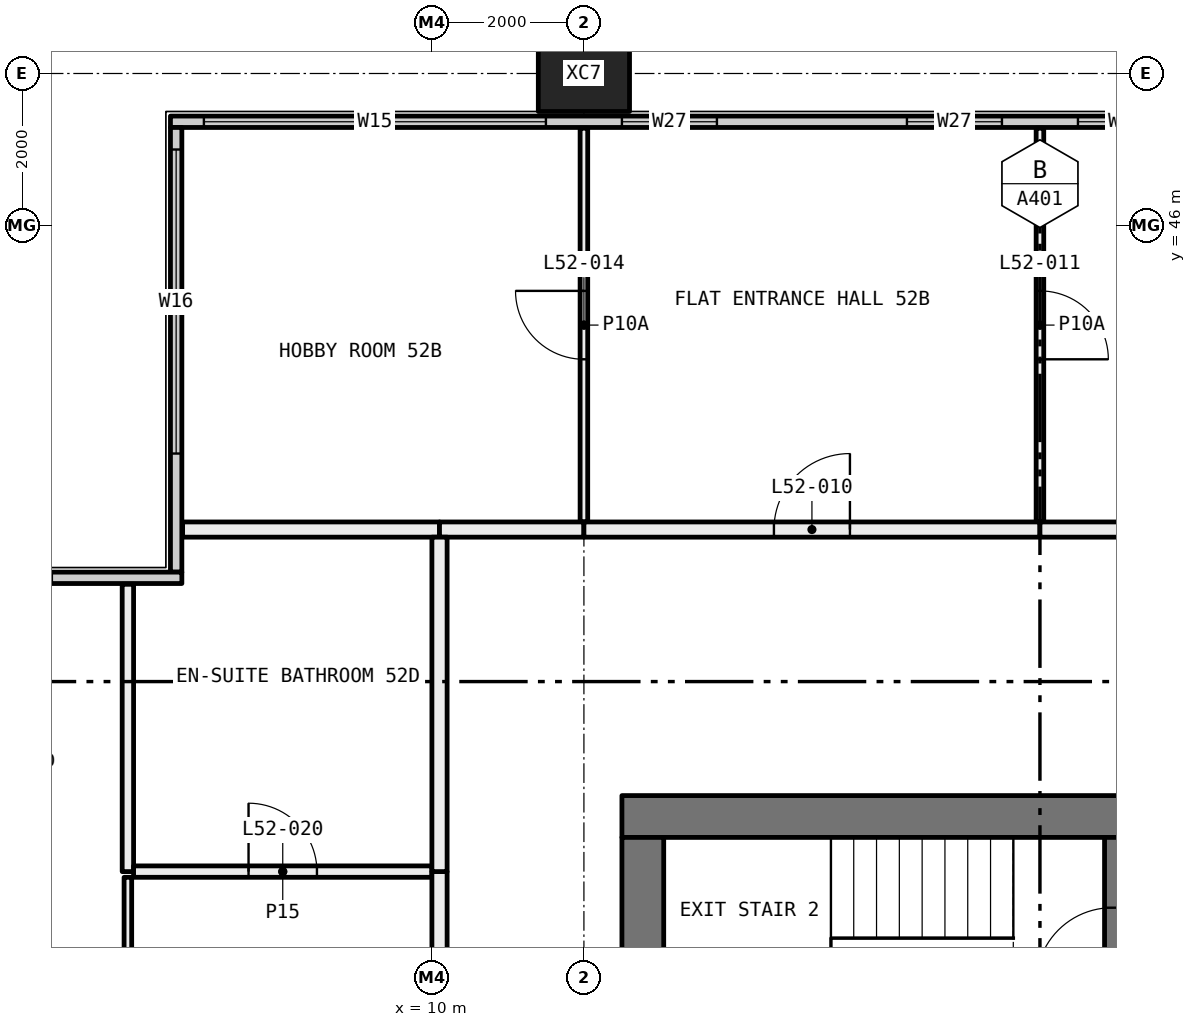
"""IFC4 building model, lengths in metres.
Left out: names, types, materials, properties, quantities, classifications, styles, units other than length and angle.
Written with IfcOpenShell. Run it as: python <this file> out.ifc"""

import sys

from ifc_helpers import new_model, si_unit, direction, frame, frame_2d, origin, origin_2d, place, context, subcontext, project, spatial, rectangle, hollow_rectangle, extrude, element, fill, save


model = new_model("IFC4")
c1 = context("Model", 3, precision=1e-05, world=origin(), true_north=direction((0.0, 1.0)))
c2 = subcontext(c1, "Body", "Model", "MODEL_VIEW")
j1 = project(units=[si_unit("LENGTHUNIT", "METRE"), si_unit("PLANEANGLEUNIT", "RADIAN")], contexts=[c1])
p1 = place(None, origin())
s1 = spatial("IfcSite", under=j1, at=p1, CompositionType="ELEMENT")
p2 = place(p1, origin())
s2 = spatial("IfcBuilding", under=s1, at=p2, CompositionType="ELEMENT")
p3 = place(p2, frame((0.0, 0.0, 196.2)))
s3 = spatial("IfcBuildingStorey", under=s2, at=p3, CompositionType="ELEMENT", Elevation=196.2)
p4 = place(p3, frame((12.0, 48.0, -0.4), z_axis=(0.0, 0.0, 1.0), x_axis=(1.0, 0.0, 0.0)))
e1 = element("IfcColumn", 1, at=p4, inside=s3, PredefinedType="COLUMN", context=c2, shape_type="SweptSolid", body=[
    extrude(hollow_rectangle(XDim=1.2, YDim=1.0, WallThickness=0.045, at=origin_2d()), origin(), (0.0, 0.0, 1.0), 3.45),
])
p5 = place(p3, frame((6.56, 47.365, 0.0), z_axis=(0.0, 0.0, 1.0), x_axis=(1.0, 0.0, 0.0)))
e2 = element("IfcWall", 2, at=p5, inside=s3, PredefinedType="ELEMENTEDWALL", context=c2, shape_type="SweptSolid", body=[
    extrude(rectangle(XDim=46.88, YDim=0.15, at=frame_2d((23.44, 0.0))), origin(), (0.0, 0.0, 1.0), 3.05),
])
p6 = place(p5, frame((0.44, 0.0, 0.45)))
e3 = element("IfcOpeningElement", 3, at=p6, cuts=e2, PredefinedType="OPENING", context=c2, shape_type="SweptSolid", body=[
    extrude(rectangle(XDim=4.5, YDim=2.55, at=frame_2d((2.25, 1.275))), frame((0.0, 0.085, 0.0), z_axis=(0.0, -1.0, 0.0), x_axis=(1.0, 0.0, 0.0)), (0.0, 0.0, 1.0), 0.17),
])
p7 = place(p5, frame((5.94, 0.0, 0.45)))
e4 = element("IfcOpeningElement", 4, at=p7, cuts=e2, PredefinedType="OPENING", context=c2, shape_type="SweptSolid", body=[
    extrude(rectangle(XDim=1.25, YDim=2.55, at=frame_2d((0.625, 1.275))), frame((0.0, 0.085, 0.0), z_axis=(0.0, -1.0, 0.0), x_axis=(1.0, 0.0, 0.0)), (0.0, 0.0, 1.0), 0.17),
])
p8 = place(p5, frame((9.69, 0.0, 0.45)))
e5 = element("IfcOpeningElement", 5, at=p8, cuts=e2, PredefinedType="OPENING", context=c2, shape_type="SweptSolid", body=[
    extrude(rectangle(XDim=1.25, YDim=2.55, at=frame_2d((0.625, 1.275))), frame((0.0, 0.085, 0.0), z_axis=(0.0, -1.0, 0.0), x_axis=(1.0, 0.0, 0.0)), (0.0, 0.0, 1.0), 0.17),
])
p9 = place(p5, frame((11.94, 0.0, 0.45)))
e6 = element("IfcOpeningElement", 6, at=p9, cuts=e2, PredefinedType="OPENING", context=c2, shape_type="SweptSolid", body=[
    extrude(rectangle(XDim=1.25, YDim=2.55, at=frame_2d((0.625, 1.275))), frame((0.0, 0.085, 0.0), z_axis=(0.0, -1.0, 0.0), x_axis=(1.0, 0.0, 0.0)), (0.0, 0.0, 1.0), 0.17),
])
p10 = place(p5, frame((15.69, 0.0, 0.45)))
e7 = element("IfcOpeningElement", 7, at=p10, cuts=e2, PredefinedType="OPENING", context=c2, shape_type="SweptSolid", body=[
    extrude(rectangle(XDim=1.25, YDim=2.55, at=frame_2d((0.625, 1.275))), frame((0.0, 0.085, 0.0), z_axis=(0.0, -1.0, 0.0), x_axis=(1.0, 0.0, 0.0)), (0.0, 0.0, 1.0), 0.17),
])
p11 = place(p5, frame((17.94, 0.0, 0.45)))
e8 = element("IfcOpeningElement", 8, at=p11, cuts=e2, PredefinedType="OPENING", context=c2, shape_type="SweptSolid", body=[
    extrude(rectangle(XDim=1.25, YDim=2.55, at=frame_2d((0.625, 1.275))), frame((0.0, 0.085, 0.0), z_axis=(0.0, -1.0, 0.0), x_axis=(1.0, 0.0, 0.0)), (0.0, 0.0, 1.0), 0.17),
])
p12 = place(p5, frame((21.69, 0.0, 0.45)))
e9 = element("IfcOpeningElement", 9, at=p12, cuts=e2, PredefinedType="OPENING", context=c2, shape_type="SweptSolid", body=[
    extrude(rectangle(XDim=1.25, YDim=2.55, at=frame_2d((0.625, 1.275))), frame((0.0, 0.085, 0.0), z_axis=(0.0, -1.0, 0.0), x_axis=(1.0, 0.0, 0.0)), (0.0, 0.0, 1.0), 0.17),
])
p13 = place(p5, frame((23.94, 0.0, 0.45)))
e10 = element("IfcOpeningElement", 10, at=p13, cuts=e2, PredefinedType="OPENING", context=c2, shape_type="SweptSolid", body=[
    extrude(rectangle(XDim=1.25, YDim=2.55, at=frame_2d((0.625, 1.275))), frame((0.0, 0.085, 0.0), z_axis=(0.0, -1.0, 0.0), x_axis=(1.0, 0.0, 0.0)), (0.0, 0.0, 1.0), 0.17),
])
p14 = place(p5, frame((27.69, 0.0, 0.45)))
e11 = element("IfcOpeningElement", 11, at=p14, cuts=e2, PredefinedType="OPENING", context=c2, shape_type="SweptSolid", body=[
    extrude(rectangle(XDim=1.25, YDim=2.55, at=frame_2d((0.625, 1.275))), frame((0.0, 0.085, 0.0), z_axis=(0.0, -1.0, 0.0), x_axis=(1.0, 0.0, 0.0)), (0.0, 0.0, 1.0), 0.17),
])
p15 = place(p5, frame((29.94, 0.0, 0.45)))
e12 = element("IfcOpeningElement", 12, at=p15, cuts=e2, PredefinedType="OPENING", context=c2, shape_type="SweptSolid", body=[
    extrude(rectangle(XDim=1.25, YDim=2.55, at=frame_2d((0.625, 1.275))), frame((0.0, 0.085, 0.0), z_axis=(0.0, -1.0, 0.0), x_axis=(1.0, 0.0, 0.0)), (0.0, 0.0, 1.0), 0.17),
])
p16 = place(p5, frame((33.69, 0.0, 0.45)))
e13 = element("IfcOpeningElement", 13, at=p16, cuts=e2, PredefinedType="OPENING", context=c2, shape_type="SweptSolid", body=[
    extrude(rectangle(XDim=1.25, YDim=2.55, at=frame_2d((0.625, 1.275))), frame((0.0, 0.085, 0.0), z_axis=(0.0, -1.0, 0.0), x_axis=(1.0, 0.0, 0.0)), (0.0, 0.0, 1.0), 0.17),
])
p17 = place(p5, frame((35.94, 0.0, 0.45)))
e14 = element("IfcOpeningElement", 14, at=p17, cuts=e2, PredefinedType="OPENING", context=c2, shape_type="SweptSolid", body=[
    extrude(rectangle(XDim=1.25, YDim=2.55, at=frame_2d((0.625, 1.275))), frame((0.0, 0.085, 0.0), z_axis=(0.0, -1.0, 0.0), x_axis=(1.0, 0.0, 0.0)), (0.0, 0.0, 1.0), 0.17),
])
p18 = place(p5, frame((39.69, 0.0, 0.45)))
e15 = element("IfcOpeningElement", 15, at=p18, cuts=e2, PredefinedType="OPENING", context=c2, shape_type="SweptSolid", body=[
    extrude(rectangle(XDim=1.25, YDim=2.55, at=frame_2d((0.625, 1.275))), frame((0.0, 0.085, 0.0), z_axis=(0.0, -1.0, 0.0), x_axis=(1.0, 0.0, 0.0)), (0.0, 0.0, 1.0), 0.17),
])
p19 = place(p5, frame((41.94, 0.0, 0.45)))
e16 = element("IfcOpeningElement", 16, at=p19, cuts=e2, PredefinedType="OPENING", context=c2, shape_type="SweptSolid", body=[
    extrude(rectangle(XDim=4.5, YDim=2.55, at=frame_2d((2.25, 1.275))), frame((0.0, 0.085, 0.0), z_axis=(0.0, -1.0, 0.0), x_axis=(1.0, 0.0, 0.0)), (0.0, 0.0, 1.0), 0.17),
])
p20 = place(p3, frame((6.635, 41.44, 0.0), z_axis=(0.0, 0.0, 1.0), x_axis=(0.0, 1.0, 0.0)))
e17 = element("IfcWall", 17, at=p20, inside=s3, PredefinedType="ELEMENTEDWALL", context=c2, shape_type="SweptSolid", body=[
    extrude(rectangle(XDim=5.85, YDim=0.15, at=frame_2d((2.925, 0.0))), origin(), (0.0, 0.0, 1.0), 3.05),
])
p21 = place(p20, frame((1.56, 0.0, 0.45)))
e18 = element("IfcOpeningElement", 18, at=p21, cuts=e17, PredefinedType="OPENING", context=c2, shape_type="SweptSolid", body=[
    extrude(rectangle(XDim=4.0, YDim=2.55, at=frame_2d((2.0, 1.275))), frame((0.0, 0.085, 0.0), z_axis=(0.0, -1.0, 0.0), x_axis=(1.0, 0.0, 0.0)), (0.0, 0.0, 1.0), 0.17),
])
p22 = place(p3, frame((0.56, 41.365, 0.0), z_axis=(0.0, 0.0, 1.0), x_axis=(1.0, 0.0, 0.0)))
e19 = element("IfcWall", 19, at=p22, inside=s3, PredefinedType="ELEMENTEDWALL", context=c2, shape_type="SweptSolid", body=[
    extrude(rectangle(XDim=6.15, YDim=0.15, at=frame_2d((3.075, 0.0))), origin(), (0.0, 0.0, 1.0), 3.05),
])
p23 = place(p22, frame((0.44, 0.0, 0.45)))
e20 = element("IfcOpeningElement", 20, at=p23, cuts=e19, PredefinedType="OPENING", context=c2, shape_type="SweptSolid", body=[
    extrude(rectangle(XDim=4.0, YDim=2.55, at=frame_2d((2.0, 1.275))), frame((0.0, 0.085, 0.0), z_axis=(0.0, -1.0, 0.0), x_axis=(1.0, 0.0, 0.0)), (0.0, 0.0, 1.0), 0.17),
])
p24 = place(p3, frame((12.0, 42.1, 0.0), z_axis=(0.0, 0.0, 1.0), x_axis=(0.0, 1.0, 0.0)))
e21 = element("IfcWall", 21, at=p24, inside=s3, PredefinedType="PARTITIONING", context=c2, shape_type="SweptSolid", body=[
    extrude(rectangle(XDim=5.18, YDim=0.1, at=frame_2d((2.59, 0.0))), origin(), (0.0, 0.0, 1.0), 3.05),
])
p25 = place(p24, frame((2.14, 0.0, 0.0)))
e22 = element("IfcOpeningElement", 22, at=p25, cuts=e21, PredefinedType="OPENING", context=c2, shape_type="SweptSolid", body=[
    extrude(rectangle(XDim=0.9, YDim=2.1, at=frame_2d((0.45, 1.05))), frame((0.0, 0.06, 0.0), z_axis=(0.0, -1.0, 0.0), x_axis=(1.0, 0.0, 0.0)), (0.0, 0.0, 1.0), 0.12),
])
p26 = place(p3, frame((6.72, 42.0, 0.0), z_axis=(0.0, 0.0, 1.0), x_axis=(1.0, 0.0, 0.0)))
e23 = element("IfcWall", 23, at=p26, inside=s3, PredefinedType="PARTITIONING", context=c2, shape_type="SweptSolid", body=[
    extrude(rectangle(XDim=3.38, YDim=0.2, at=frame_2d((1.69, 0.0))), origin(), (0.0, 0.0, 1.0), 3.05),
])
p27 = place(p3, frame((10.1, 42.0, 0.0), z_axis=(0.0, 0.0, 1.0), x_axis=(1.0, 0.0, 0.0)))
e24 = element("IfcWall", 24, at=p27, inside=s3, PredefinedType="PARTITIONING", context=c2, shape_type="SweptSolid", body=[
    extrude(rectangle(XDim=1.9, YDim=0.2, at=frame_2d((0.95, 0.0))), origin(), (0.0, 0.0, 1.0), 3.05),
])
p28 = place(p3, frame((18.0, 42.1, 0.0), z_axis=(0.0, 0.0, 1.0), x_axis=(0.0, 1.0, 0.0)))
e25 = element("IfcWall", 25, at=p28, inside=s3, PredefinedType="PARTITIONING", context=c2, shape_type="SweptSolid", body=[
    extrude(rectangle(XDim=5.18, YDim=0.1, at=frame_2d((2.59, 0.0))), origin(), (0.0, 0.0, 1.0), 3.05),
])
p29 = place(p28, frame((2.14, 0.0, 0.0)))
e26 = element("IfcOpeningElement", 26, at=p29, cuts=e25, PredefinedType="OPENING", context=c2, shape_type="SweptSolid", body=[
    extrude(rectangle(XDim=0.9, YDim=2.1, at=frame_2d((0.45, 1.05))), frame((0.0, 0.06, 0.0), z_axis=(0.0, -1.0, 0.0), x_axis=(1.0, 0.0, 0.0)), (0.0, 0.0, 1.0), 0.12),
])
p30 = place(p3, frame((12.0, 42.0, 0.0), z_axis=(0.0, 0.0, 1.0), x_axis=(1.0, 0.0, 0.0)))
e27 = element("IfcWall", 27, at=p30, inside=s3, PredefinedType="PARTITIONING", context=c2, shape_type="SweptSolid", body=[
    extrude(rectangle(XDim=6.0, YDim=0.2, at=frame_2d((3.0, 0.0))), origin(), (0.0, 0.0, 1.0), 3.05),
])
p31 = place(p30, frame((2.5, 0.0, 0.0)))
e28 = element("IfcOpeningElement", 28, at=p31, cuts=e27, PredefinedType="OPENING", context=c2, shape_type="SweptSolid", body=[
    extrude(rectangle(XDim=1.0, YDim=2.1, at=frame_2d((0.5, 1.05))), frame((0.0, 0.11, 0.0), z_axis=(0.0, -1.0, 0.0), x_axis=(1.0, 0.0, 0.0)), (0.0, 0.0, 1.0), 0.22),
])
p32 = place(p3, frame((18.0, 42.0, 0.0), z_axis=(0.0, 0.0, 1.0), x_axis=(1.0, 0.0, 0.0)))
e29 = element("IfcWall", 29, at=p32, inside=s3, PredefinedType="PARTITIONING", context=c2, shape_type="SweptSolid", body=[
    extrude(rectangle(XDim=12.0, YDim=0.2, at=frame_2d((6.0, 0.0))), origin(), (0.0, 0.0, 1.0), 3.05),
])
p33 = place(p3, frame((6.0, 36.05, 0.0), z_axis=(0.0, 0.0, 1.0), x_axis=(0.0, 1.0, 0.0)))
e30 = element("IfcWall", 30, at=p33, inside=s3, PredefinedType="PARTITIONING", context=c2, shape_type="SweptSolid", body=[
    extrude(rectangle(XDim=1.375, YDim=0.1, at=frame_2d((0.688, 0.0))), origin(), (0.0, 0.0, 1.0), 2.45),
])
p34 = place(p3, frame((6.0, 37.5, 0.0), z_axis=(0.0, 0.0, 1.0), x_axis=(0.0, 1.0, 0.0)))
e31 = element("IfcWall", 31, at=p34, inside=s3, PredefinedType="PARTITIONING", context=c2, shape_type="SweptSolid", body=[
    extrude(rectangle(XDim=3.78, YDim=0.15, at=frame_2d((1.89, 0.0))), origin(), (0.0, 0.0, 1.0), 3.05),
])
p35 = place(p3, frame((10.0, 37.5, 0.0), z_axis=(0.0, 0.0, 1.0), x_axis=(-1.0, 0.0, 0.0)))
e32 = element("IfcWall", 32, at=p35, inside=s3, PredefinedType="PARTITIONING", context=c2, shape_type="SweptSolid", body=[
    extrude(rectangle(XDim=3.925, YDim=0.15, at=frame_2d((1.962, 0.0))), origin(), (0.0, 0.0, 1.0), 3.05),
])
p36 = place(p35, frame((1.512, 0.0, 0.0)))
e33 = element("IfcOpeningElement", 33, at=p36, cuts=e32, PredefinedType="OPENING", context=c2, shape_type="SweptSolid", body=[
    extrude(rectangle(XDim=0.9, YDim=2.1, at=frame_2d((0.45, 1.05))), frame((0.0, 0.085, 0.0), z_axis=(0.0, -1.0, 0.0), x_axis=(1.0, 0.0, 0.0)), (0.0, 0.0, 1.0), 0.17),
])
p37 = place(p3, frame((10.1, 36.1, 0.0), z_axis=(0.0, 0.0, 1.0), x_axis=(0.0, 1.0, 0.0)))
e34 = element("IfcWall", 34, at=p37, inside=s3, PredefinedType="PARTITIONING", context=c2, shape_type="SweptSolid", body=[
    extrude(rectangle(XDim=1.4, YDim=0.2, at=frame_2d((0.7, 0.0))), origin(), (0.0, 0.0, 1.0), 3.05),
])
p38 = place(p3, frame((10.1, 37.5, 0.0), z_axis=(0.0, 0.0, 1.0), x_axis=(0.0, 1.0, 0.0)))
e35 = element("IfcWall", 35, at=p38, inside=s3, PredefinedType="PARTITIONING", context=c2, shape_type="SweptSolid", body=[
    extrude(rectangle(XDim=4.4, YDim=0.2, at=frame_2d((2.2, 0.0))), origin(), (0.0, 0.0, 1.0), 3.05),
])
p39 = place(p3, frame((12.5, 38.225, 0.0), z_axis=(0.0, 0.0, 1.0), x_axis=(1.0, 0.0, 0.0)))
e36 = element("IfcWall", 36, at=p39, inside=s3, PredefinedType="SHEAR", context=c2, shape_type="SweptSolid", body=[
    extrude(rectangle(XDim=11.0, YDim=0.55, at=frame_2d((5.5, 0.0))), origin(), (0.0, 0.0, 1.0), 3.05),
])
p40 = place(p39, frame((8.525, 0.0, 0.0)))
e37 = element("IfcOpeningElement", 37, at=p40, cuts=e36, PredefinedType="OPENING", context=c2, shape_type="SweptSolid", body=[
    extrude(rectangle(XDim=1.6, YDim=2.1, at=frame_2d((0.8, 1.05))), frame((0.0, 0.285, 0.0), z_axis=(0.0, -1.0, 0.0), x_axis=(1.0, 0.0, 0.0)), (0.0, 0.0, 1.0), 0.57),
])
p41 = place(p3, frame((12.775, 22.05, 0.0), z_axis=(0.0, 0.0, 1.0), x_axis=(0.0, 1.0, 0.0)))
e38 = element("IfcWall", 38, at=p41, inside=s3, PredefinedType="SHEAR", context=c2, shape_type="SweptSolid", body=[
    extrude(rectangle(XDim=15.9, YDim=0.55, at=frame_2d((7.95, 0.0))), origin(), (0.0, 0.0, 1.0), 3.05),
])
p42 = place(p41, frame((8.4, 0.0, 0.0)))
e39 = element("IfcOpeningElement", 39, at=p42, cuts=e38, PredefinedType="OPENING", context=c2, shape_type="SweptSolid", body=[
    extrude(rectangle(XDim=1.6, YDim=2.1, at=frame_2d((0.8, 1.05))), frame((0.0, 0.285, 0.0), z_axis=(0.0, -1.0, 0.0), x_axis=(1.0, 0.0, 0.0)), (0.0, 0.0, 1.0), 0.57),
])
p43 = place(p41, frame((2.175, 0.0, 0.0)))
e40 = element("IfcOpeningElement", 40, at=p43, cuts=e38, PredefinedType="OPENING", context=c2, shape_type="SweptSolid", body=[
    extrude(rectangle(XDim=1.0, YDim=2.1, at=frame_2d((0.5, 1.05))), frame((0.0, 0.285, 0.0), z_axis=(0.0, -1.0, 0.0), x_axis=(1.0, 0.0, 0.0)), (0.0, 0.0, 1.0), 0.57),
])
p44 = place(p3, frame((18.95, 35.1, 0.0), z_axis=(0.0, 0.0, 1.0), x_axis=(0.0, 1.0, 0.0)))
e41 = element("IfcWall", 41, at=p44, inside=s3, PredefinedType="SOLIDWALL", context=c2, shape_type="SweptSolid", body=[
    extrude(rectangle(XDim=2.85, YDim=0.2, at=frame_2d((1.425, 0.0))), origin(), (0.0, 0.0, 1.0), 3.05),
])
p45 = place(p44, frame((0.925, 0.0, 0.0)))
e42 = element("IfcOpeningElement", 42, at=p45, cuts=e41, PredefinedType="OPENING", context=c2, shape_type="SweptSolid", body=[
    extrude(rectangle(XDim=1.0, YDim=2.1, at=frame_2d((0.5, 1.05))), frame((0.0, 0.11, 0.0), z_axis=(0.0, -1.0, 0.0), x_axis=(1.0, 0.0, 0.0)), (0.0, 0.0, 1.0), 0.22),
])
p46 = place(p6, origin())
e43 = element("IfcWindow", 43, at=p46, inside=s3, PartitioningType="SINGLE_PANEL", PredefinedType="WINDOW", context=c2, shape_type="SweptSolid", body=[
    extrude(rectangle(XDim=4.5, YDim=2.55, at=frame_2d((2.25, 1.275))), frame((0.0, 0.03, 0.0), z_axis=(0.0, -1.0, 0.0), x_axis=(1.0, 0.0, 0.0)), (0.0, 0.0, 1.0), 0.06),
])
fill(e3, e43)
p47 = place(p7, origin())
e44 = element("IfcWindow", 44, at=p47, inside=s3, PartitioningType="SINGLE_PANEL", PredefinedType="WINDOW", context=c2, shape_type="SweptSolid", body=[
    extrude(rectangle(XDim=1.25, YDim=2.55, at=frame_2d((0.625, 1.275))), frame((0.0, 0.03, 0.0), z_axis=(0.0, -1.0, 0.0), x_axis=(1.0, 0.0, 0.0)), (0.0, 0.0, 1.0), 0.06),
])
fill(e4, e44)
p48 = place(p8, origin())
e45 = element("IfcWindow", 45, at=p48, inside=s3, PartitioningType="SINGLE_PANEL", PredefinedType="WINDOW", context=c2, shape_type="SweptSolid", body=[
    extrude(rectangle(XDim=1.25, YDim=2.55, at=frame_2d((0.625, 1.275))), frame((0.0, 0.03, 0.0), z_axis=(0.0, -1.0, 0.0), x_axis=(1.0, 0.0, 0.0)), (0.0, 0.0, 1.0), 0.06),
])
fill(e5, e45)
p49 = place(p9, origin())
e46 = element("IfcWindow", 46, at=p49, inside=s3, PartitioningType="SINGLE_PANEL", PredefinedType="WINDOW", context=c2, shape_type="SweptSolid", body=[
    extrude(rectangle(XDim=1.25, YDim=2.55, at=frame_2d((0.625, 1.275))), frame((0.0, 0.03, 0.0), z_axis=(0.0, -1.0, 0.0), x_axis=(1.0, 0.0, 0.0)), (0.0, 0.0, 1.0), 0.06),
])
fill(e6, e46)
p50 = place(p21, origin())
e47 = element("IfcWindow", 47, at=p50, inside=s3, PartitioningType="SINGLE_PANEL", PredefinedType="WINDOW", context=c2, shape_type="SweptSolid", body=[
    extrude(rectangle(XDim=4.0, YDim=2.55, at=frame_2d((2.0, 1.275))), frame((0.0, 0.03, 0.0), z_axis=(0.0, -1.0, 0.0), x_axis=(1.0, 0.0, 0.0)), (0.0, 0.0, 1.0), 0.06),
])
fill(e18, e47)
p51 = place(p31, origin())
e48 = element("IfcDoor", 48, at=p51, inside=s3, OperationType="SINGLE_SWING_LEFT", PredefinedType="DOOR", context=c2, shape_type="SweptSolid", body=[
    extrude(rectangle(XDim=1.0, YDim=2.1, at=frame_2d((0.5, 1.05))), frame((0.0, 0.025, 0.0), z_axis=(0.0, -1.0, 0.0), x_axis=(1.0, 0.0, 0.0)), (0.0, 0.0, 1.0), 0.05),
])
fill(e28, e48)
p52 = place(p29, frame((0.9, 0.0, 0.0), x_axis=(-1.0, 0.0, 0.0)))
e49 = element("IfcDoor", 49, at=p52, inside=s3, OperationType="SINGLE_SWING_LEFT", PredefinedType="DOOR", context=c2, shape_type="SweptSolid", body=[
    extrude(rectangle(XDim=0.9, YDim=2.1, at=frame_2d((0.45, 1.05))), frame((0.0, 0.025, 0.0), z_axis=(0.0, -1.0, 0.0), x_axis=(1.0, 0.0, 0.0)), (0.0, 0.0, 1.0), 0.05),
])
fill(e26, e49)
p53 = place(p25, origin())
e50 = element("IfcDoor", 50, at=p53, inside=s3, OperationType="SINGLE_SWING_LEFT", PredefinedType="DOOR", context=c2, shape_type="SweptSolid", body=[
    extrude(rectangle(XDim=0.9, YDim=2.1, at=frame_2d((0.45, 1.05))), frame((0.0, 0.025, 0.0), z_axis=(0.0, -1.0, 0.0), x_axis=(1.0, 0.0, 0.0)), (0.0, 0.0, 1.0), 0.05),
])
fill(e22, e50)
p54 = place(p36, frame((0.9, 0.0, 0.0), x_axis=(-1.0, 0.0, 0.0)))
e51 = element("IfcDoor", 51, at=p54, inside=s3, OperationType="SINGLE_SWING_RIGHT", PredefinedType="DOOR", context=c2, shape_type="SweptSolid", body=[
    extrude(rectangle(XDim=0.9, YDim=2.1, at=frame_2d((0.45, 1.05))), frame((0.0, 0.025, 0.0), z_axis=(0.0, -1.0, 0.0), x_axis=(1.0, 0.0, 0.0)), (0.0, 0.0, 1.0), 0.05),
])
fill(e33, e51)
p55 = place(p45, origin())
e52 = element("IfcDoor", 52, at=p55, inside=s3, OperationType="SINGLE_SWING_RIGHT", PredefinedType="DOOR", context=c2, shape_type="SweptSolid", body=[
    extrude(rectangle(XDim=1.0, YDim=2.1, at=frame_2d((0.5, 1.05))), frame((0.0, 0.025, 0.0), z_axis=(0.0, -1.0, 0.0), x_axis=(1.0, 0.0, 0.0)), (0.0, 0.0, 1.0), 0.05),
])
fill(e42, e52)
save(model, sys.argv[1])
